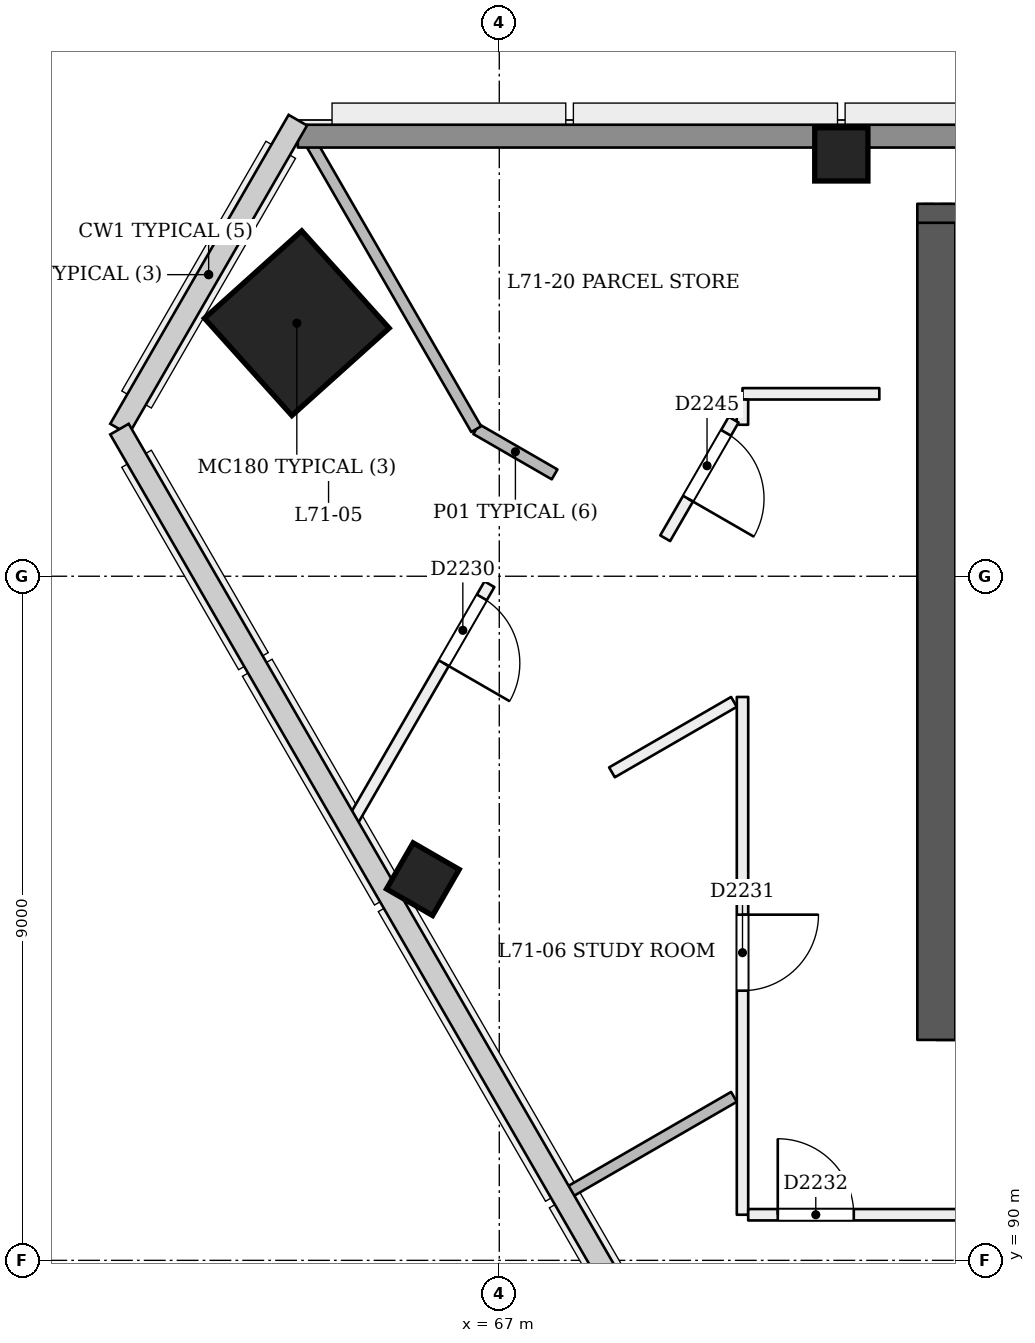
"""IFC4 building model, lengths in metres.
Left out: names, types, materials, properties, quantities, classifications, styles, units other than length and angle.
Written with IfcOpenShell. Run it as: python <this file> out.ifc"""

import sys

from ifc_helpers import new_model, si_unit, direction, frame, frame_2d, origin, origin_2d, place, context, subcontext, project, spatial, rectangle, extrude, element, fill, save


model = new_model("IFC4")
c1 = context("Model", 3, precision=1e-05, world=origin(), true_north=direction((0.0, 1.0)))
c2 = subcontext(c1, "Body", "Model", "MODEL_VIEW")
j1 = project(units=[si_unit("LENGTHUNIT", "METRE"), si_unit("PLANEANGLEUNIT", "RADIAN")], contexts=[c1])
p1 = place(None, origin())
s1 = spatial("IfcSite", under=j1, at=p1, CompositionType="ELEMENT")
p2 = place(p1, origin())
s2 = spatial("IfcBuilding", under=s1, at=p2, CompositionType="ELEMENT")
p3 = place(p2, frame((0.0, 0.0, 275.2)))
s3 = spatial("IfcBuildingStorey", under=s2, at=p3, CompositionType="ELEMENT", Elevation=275.2)
p4 = place(p3, frame((72.75, 93.15, 0.0), z_axis=(0.0, 0.0, 1.0), x_axis=(1.0, 0.0, 0.0)))
e1 = element("IfcWall", 1, at=p4, inside=s3, PredefinedType="SHEAR", context=c2, shape_type="SweptSolid", body=[
    extrude(rectangle(XDim=24.75, YDim=0.5, at=frame_2d((12.375, 0.0))), origin(), (0.0, 0.0, 1.0), 3.6),
])
p5 = place(p4, frame((1.05, 0.0, 0.0)))
e2 = element("IfcOpeningElement", 2, at=p5, cuts=e1, PredefinedType="OPENING", context=c2, shape_type="SweptSolid", body=[
    extrude(rectangle(XDim=1.2, YDim=2.1, at=frame_2d((0.6, 1.05))), frame((0.0, 0.26, 0.0), z_axis=(0.0, -1.0, 0.0), x_axis=(1.0, 0.0, 0.0)), (0.0, 0.0, 1.0), 0.521),
])
p6 = place(p4, frame((3.25, 0.0, 0.0)))
e3 = element("IfcOpeningElement", 3, at=p6, cuts=e1, PredefinedType="OPENING", context=c2, shape_type="SweptSolid", body=[
    extrude(rectangle(XDim=1.2, YDim=2.1, at=frame_2d((0.6, 1.05))), frame((0.0, 0.26, 0.0), z_axis=(0.0, -1.0, 0.0), x_axis=(1.0, 0.0, 0.0)), (0.0, 0.0, 1.0), 0.521),
])
p7 = place(p4, frame((13.25, 0.0, 0.0)))
e4 = element("IfcOpeningElement", 4, at=p7, cuts=e1, PredefinedType="OPENING", context=c2, shape_type="SweptSolid", body=[
    extrude(rectangle(XDim=1.2, YDim=2.1, at=frame_2d((0.6, 1.05))), frame((0.0, 0.26, 0.0), z_axis=(0.0, -1.0, 0.0), x_axis=(1.0, 0.0, 0.0)), (0.0, 0.0, 1.0), 0.521),
])
p8 = place(p4, frame((15.312, 0.0, 0.0)))
e5 = element("IfcOpeningElement", 5, at=p8, cuts=e1, PredefinedType="OPENING", context=c2, shape_type="SweptSolid", body=[
    extrude(rectangle(XDim=1.0, YDim=2.1, at=frame_2d((0.5, 1.05))), frame((0.0, 0.26, 0.0), z_axis=(0.0, -1.0, 0.0), x_axis=(1.0, 0.0, 0.0)), (0.0, 0.0, 1.0), 0.521),
])
p9 = place(p4, frame((17.55, 0.0, 0.0)))
e6 = element("IfcOpeningElement", 6, at=p9, cuts=e1, PredefinedType="OPENING", context=c2, shape_type="SweptSolid", body=[
    extrude(rectangle(XDim=1.0, YDim=2.1, at=frame_2d((0.5, 1.05))), frame((0.0, 0.26, 0.0), z_axis=(0.0, -1.0, 0.0), x_axis=(1.0, 0.0, 0.0)), (0.0, 0.0, 1.0), 0.521),
])
p10 = place(p4, frame((20.1, 0.0, 0.0)))
e7 = element("IfcOpeningElement", 7, at=p10, cuts=e1, PredefinedType="OPENING", context=c2, shape_type="SweptSolid", body=[
    extrude(rectangle(XDim=1.0, YDim=2.1, at=frame_2d((0.5, 1.05))), frame((0.0, 0.26, 0.0), z_axis=(0.0, -1.0, 0.0), x_axis=(1.0, 0.0, 0.0)), (0.0, 0.0, 1.0), 0.521),
])
p11 = place(p4, frame((22.587, 0.0, 0.0)))
e8 = element("IfcOpeningElement", 8, at=p11, cuts=e1, PredefinedType="OPENING", context=c2, shape_type="SweptSolid", body=[
    extrude(rectangle(XDim=1.0, YDim=2.1, at=frame_2d((0.5, 1.05))), frame((0.0, 0.26, 0.0), z_axis=(0.0, -1.0, 0.0), x_axis=(1.0, 0.0, 0.0)), (0.0, 0.0, 1.0), 0.521),
])
p12 = place(p3, frame((97.25, 103.65, 0.0), z_axis=(0.0, 0.0, 1.0), x_axis=(-1.0, 0.0, 0.0)))
e9 = element("IfcWall", 9, at=p12, inside=s3, PredefinedType="SHEAR", context=c2, shape_type="SweptSolid", body=[
    extrude(rectangle(XDim=24.75, YDim=0.5, at=frame_2d((12.375, 0.0))), origin(), (0.0, 0.0, 1.0), 3.6),
])
p13 = place(p3, frame((72.75, 103.65, 0.0), z_axis=(0.0, 0.0, 1.0), x_axis=(0.0, -1.0, 0.0)))
e10 = element("IfcWall", 10, at=p13, inside=s3, PredefinedType="SHEAR", context=c2, shape_type="SweptSolid", body=[
    extrude(rectangle(XDim=10.75, YDim=0.5, at=frame_2d((5.375, 0.0))), origin(), (0.0, 0.0, 1.0), 3.6),
])
p14 = place(p3, frame((64.302, 102.318, 0.0), z_axis=(0.028401796786, 0.009286506348, 0.999553449666), x_axis=(-0.866200461857, 0.499297311778, 0.019973841164)))
e11 = element("IfcColumn", 11, at=p14, inside=s3, PredefinedType="COLUMN", context=c2, shape_type="SweptSolid", body=[
    extrude(rectangle(XDim=1.72, YDim=1.72, at=origin_2d()), origin(), (0.0, 0.0, 1.0), 3.602),
])
p15 = place(p3, frame((71.5, 104.55, 0.0), z_axis=(0.0, 0.0, 1.0), x_axis=(1.0, 0.0, 0.0)))
e12 = element("IfcColumn", 12, at=p15, inside=s3, PredefinedType="COLUMN", context=c2, shape_type="SweptSolid", body=[
    extrude(rectangle(XDim=0.7, YDim=0.7, at=origin_2d()), origin(), (0.0, 0.0, 1.0), 3.6),
])
p16 = place(p3, frame((65.968, 94.968, -0.021), z_axis=(0.022221406801, 0.038413224561, 0.999014831351), x_axis=(-0.8660213715, -0.498527787681, 0.038432135187)))
e13 = element("IfcColumn", 13, at=p16, inside=s3, PredefinedType="COLUMN", context=c2, shape_type="SweptSolid", body=[
    extrude(rectangle(XDim=0.7, YDim=0.7, at=origin_2d()), origin(), (0.0, 0.0, 1.0), 3.604),
])
p17 = place(p3, frame((66.871, 98.895, 0.0), z_axis=(0.0, 0.0, 1.0), x_axis=(-0.499994217234, -0.86602874244, 0.0)))
e14 = element("IfcWall", 14, at=p17, inside=s3, PredefinedType="PARTITIONING", context=c2, shape_type="SweptSolid", body=[
    extrude(rectangle(XDim=3.603, YDim=0.15, at=frame_2d((1.802, 0.0))), origin(), (0.0, 0.0, 1.0), 2.7),
])
p18 = place(p17, frame((0.2, 0.0, 0.0)))
e15 = element("IfcOpeningElement", 15, at=p18, cuts=e14, PredefinedType="OPENING", context=c2, shape_type="SweptSolid", body=[
    extrude(rectangle(XDim=1.0, YDim=2.1, at=frame_2d((0.5, 1.05))), frame((0.0, 0.085, 0.0), z_axis=(0.0, -1.0, 0.0), x_axis=(1.0, 0.0, 0.0)), (0.0, 0.0, 1.0), 0.171),
])
p19 = place(p3, frame((68.483, 96.42, 0.0), z_axis=(0.0, 0.0, 1.0), x_axis=(0.866021029023, 0.500007577232, 0.0)))
e16 = element("IfcWall", 16, at=p19, inside=s3, PredefinedType="PARTITIONING", context=c2, shape_type="SweptSolid", body=[
    extrude(rectangle(XDim=1.853, YDim=0.15, at=frame_2d((0.927, 0.0))), origin(), (0.0, 0.0, 1.0), 3.2),
])
p20 = place(p3, frame((70.2, 97.412, 0.0), z_axis=(0.0, 0.0, 1.0), x_axis=(0.0, -1.0, 0.0)))
e17 = element("IfcWall", 17, at=p20, inside=s3, PredefinedType="PARTITIONING", context=c2, shape_type="SweptSolid", body=[
    extrude(rectangle(XDim=6.812, YDim=0.15, at=frame_2d((3.406, 0.0))), origin(), (0.0, 0.0, 1.0), 3.2),
])
p21 = place(p20, frame((2.864, 0.0, 0.0)))
e18 = element("IfcOpeningElement", 18, at=p21, cuts=e17, PredefinedType="OPENING", context=c2, shape_type="SweptSolid", body=[
    extrude(rectangle(XDim=1.0, YDim=2.1, at=frame_2d((0.5, 1.05))), frame((0.0, 0.085, 0.0), z_axis=(0.0, -1.0, 0.0), x_axis=(1.0, 0.0, 0.0)), (0.0, 0.0, 1.0), 0.171),
])
p22 = place(p3, frame((70.275, 90.6, 0.0), z_axis=(0.0, 0.0, 1.0), x_axis=(1.0, 0.0, 0.0)))
e19 = element("IfcWall", 19, at=p22, inside=s3, PredefinedType="PARTITIONING", context=c2, shape_type="SweptSolid", body=[
    extrude(rectangle(XDim=5.201, YDim=0.15, at=frame_2d((2.601, 0.0))), origin(), (0.0, 0.0, 1.0), 3.2),
])
p23 = place(p22, frame((0.389, 0.0, 0.0)))
e20 = element("IfcOpeningElement", 20, at=p23, cuts=e19, PredefinedType="OPENING", context=c2, shape_type="SweptSolid", body=[
    extrude(rectangle(XDim=1.0, YDim=2.1, at=frame_2d((0.5, 1.05))), frame((0.0, 0.085, 0.0), z_axis=(0.0, -1.0, 0.0), x_axis=(1.0, 0.0, 0.0)), (0.0, 0.0, 1.0), 0.171),
])
p24 = place(p3, frame((72.0, 101.4, 0.0), z_axis=(0.0, 0.0, 1.0), x_axis=(-1.0, 0.0, 0.0)))
e21 = element("IfcWall", 21, at=p24, inside=s3, PredefinedType="PARTITIONING", context=c2, shape_type="SweptSolid", body=[
    extrude(rectangle(XDim=1.8, YDim=0.15, at=frame_2d((0.9, 0.0))), origin(), (0.0, 0.0, 1.0), 3.2),
])
p25 = place(p3, frame((70.2, 101.325, 0.0), z_axis=(0.0, 0.0, 1.0), x_axis=(-0.002205876986, -0.99999756705, 0.0)))
e22 = element("IfcWall", 22, at=p25, inside=s3, PredefinedType="PARTITIONING", context=c2, shape_type="SweptSolid", body=[
    extrude(rectangle(XDim=0.332, YDim=0.15, at=frame_2d((0.166, 0.0))), origin(), (0.0, 0.0, 1.0), 3.2),
])
p26 = place(p3, frame((70.083, 101.06, 0.0), z_axis=(0.0, 0.0, 1.0), x_axis=(-0.500031425827, -0.866007259314, 0.0)))
e23 = element("IfcWall", 23, at=p26, inside=s3, PredefinedType="PARTITIONING", context=c2, shape_type="SweptSolid", body=[
    extrude(rectangle(XDim=1.801, YDim=0.15, at=frame_2d((0.901, 0.0))), origin(), (0.0, 0.0, 1.0), 3.2),
])
p27 = place(p26, frame((0.2, 0.0, 0.0)))
e24 = element("IfcOpeningElement", 24, at=p27, cuts=e23, PredefinedType="OPENING", context=c2, shape_type="SweptSolid", body=[
    extrude(rectangle(XDim=1.0, YDim=2.1, at=frame_2d((0.5, 1.05))), frame((0.0, 0.085, 0.0), z_axis=(0.0, -1.0, 0.0), x_axis=(1.0, 0.0, 0.0)), (0.0, 0.0, 1.0), 0.171),
])
p28 = place(p3, frame((67.728, 100.34, 0.0), z_axis=(0.0, 0.0, 1.0), x_axis=(-0.866052464367, 0.499953126767, 0.0)))
e25 = element("IfcWall", 25, at=p28, inside=s3, PredefinedType="PARTITIONING", context=c2, shape_type="SweptSolid", body=[
    extrude(rectangle(XDim=1.191, YDim=0.15, at=frame_2d((0.595, 0.0))), origin(), (0.0, 0.0, 1.0), 3.2),
])
p29 = place(p3, frame((66.697, 100.936, 0.0), z_axis=(0.0, 0.0, 1.0), x_axis=(-0.499999453156, 0.866025719504, 0.0)))
e26 = element("IfcWall", 26, at=p29, inside=s3, PredefinedType="PARTITIONING", context=c2, shape_type="SweptSolid", body=[
    extrude(rectangle(XDim=4.578, YDim=0.15, at=frame_2d((2.289, 0.0))), origin(), (0.0, 0.0, 1.0), 2.7),
])
p30 = place(p3, frame((67.897, 90.886, 0.0), z_axis=(0.0, 0.0, 1.0), x_axis=(0.866018376776, 0.500012170939, 0.0)))
e27 = element("IfcWall", 27, at=p30, inside=s3, PredefinedType="PARTITIONING", context=c2, shape_type="SweptSolid", body=[
    extrude(rectangle(XDim=2.529, YDim=0.15, at=frame_2d((1.264, 0.0))), origin(), (0.0, 0.0, 1.0), 2.7),
])
p31 = place(p3, frame((70.165, 86.999, 0.0), z_axis=(0.0, 0.0, 1.0), x_axis=(0.866025537322, 0.499999768706, 0.0)))
e28 = element("IfcWall", 28, at=p31, inside=s3, PredefinedType="PARTITIONING", context=c2, shape_type="SweptSolid", body=[
    extrude(rectangle(XDim=6.325, YDim=0.15, at=frame_2d((3.163, 0.0))), origin(), (0.0, 0.0, 1.0), 2.7),
])
p32 = place(p3, frame((64.35, 104.79, 0.0), z_axis=(0.0, 0.0, 1.0), x_axis=(1.0, 0.0, 0.0)))
e29 = element("IfcWall", 29, at=p32, inside=s3, PredefinedType="SOLIDWALL", context=c2, shape_type="SweptSolid", body=[
    extrude(rectangle(XDim=41.3, YDim=0.3, at=frame_2d((20.65, 0.0))), origin(), (0.0, 0.0, 1.0), 2.7),
])
p33 = place(p18, origin())
e30 = element("IfcDoor", 30, at=p33, inside=s3, OperationType="SINGLE_SWING_RIGHT", PredefinedType="NOTDEFINED", context=c2, shape_type="SweptSolid", body=[
    extrude(rectangle(XDim=1.0, YDim=2.1, at=frame_2d((0.5, 1.05))), frame((0.0, 0.025, 0.0), z_axis=(0.0, -1.0, 0.0), x_axis=(1.0, 0.0, 0.0)), (0.0, 0.0, 1.0), 0.05),
])
fill(e15, e30)
p34 = place(p21, origin())
e31 = element("IfcDoor", 31, at=p34, inside=s3, OperationType="SINGLE_SWING_LEFT", PredefinedType="NOTDEFINED", context=c2, shape_type="SweptSolid", body=[
    extrude(rectangle(XDim=1.0, YDim=2.1, at=frame_2d((0.5, 1.05))), frame((0.0, 0.025, 0.0), z_axis=(0.0, -1.0, 0.0), x_axis=(1.0, 0.0, 0.0)), (0.0, 0.0, 1.0), 0.05),
])
fill(e18, e31)
p35 = place(p23, origin())
e32 = element("IfcDoor", 32, at=p35, inside=s3, OperationType="SINGLE_SWING_LEFT", PredefinedType="NOTDEFINED", context=c2, shape_type="SweptSolid", body=[
    extrude(rectangle(XDim=1.0, YDim=2.1, at=frame_2d((0.5, 1.05))), frame((0.0, 0.025, 0.0), z_axis=(0.0, -1.0, 0.0), x_axis=(1.0, 0.0, 0.0)), (0.0, 0.0, 1.0), 0.05),
])
fill(e20, e32)
p36 = place(p27, origin())
e33 = element("IfcDoor", 33, at=p36, inside=s3, OperationType="SINGLE_SWING_RIGHT", PredefinedType="NOTDEFINED", context=c2, shape_type="SweptSolid", body=[
    extrude(rectangle(XDim=1.0, YDim=2.1, at=frame_2d((0.5, 1.05))), frame((0.0, 0.025, 0.0), z_axis=(0.0, -1.0, 0.0), x_axis=(1.0, 0.0, 0.0)), (0.0, 0.0, 1.0), 0.05),
])
fill(e24, e33)
save(model, sys.argv[1])
